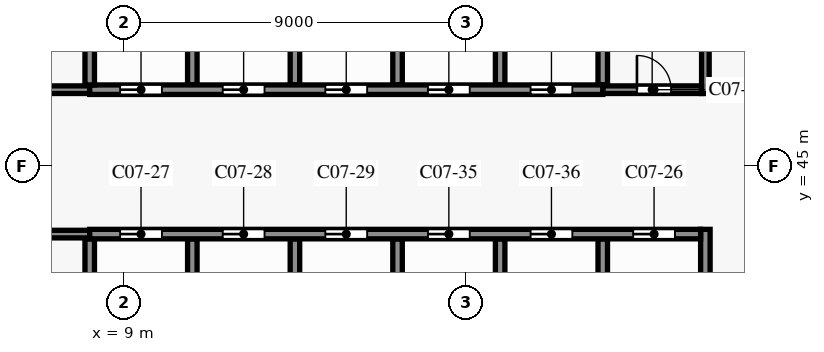
"""IFC4 building model, lengths in metres.
Left out: names, types, materials, properties, quantities, classifications, styles, units other than length and angle.
Written with IfcOpenShell. Run it as: python <this file> out.ifc"""

import sys

from ifc_helpers import new_model, si_unit, direction, frame, frame_2d, origin, place, context, subcontext, project, spatial, rectangle, extrude, element, fill, save


model = new_model("IFC4")
c1 = context("Model", 3, precision=1e-05, world=origin(), true_north=direction((0.0, 1.0)))
c2 = subcontext(c1, "Body", "Model", "MODEL_VIEW")
j1 = project(units=[si_unit("LENGTHUNIT", "METRE"), si_unit("PLANEANGLEUNIT", "RADIAN")], contexts=[c1])
p1 = place(None, origin())
s1 = spatial("IfcSite", under=j1, at=p1, CompositionType="ELEMENT")
p2 = place(p1, origin())
s2 = spatial("IfcBuilding", under=s1, at=p2, CompositionType="ELEMENT")
p3 = place(p2, frame((0.0, 0.0, 32.0)))
s3 = spatial("IfcBuildingStorey", under=s2, at=p3, CompositionType="ELEMENT", Elevation=32.0)
p4 = place(p3, frame((0.15, 43.2, 0.0), z_axis=(0.0, 0.0, 1.0), x_axis=(1.0, 0.0, 0.0)))
e1 = element("IfcWall", 1, at=p4, inside=s3, PredefinedType="PARTITIONING", context=c2, shape_type="SweptSolid", body=[
    extrude(rectangle(XDim=7.95, YDim=0.2, at=frame_2d((3.975, 0.0))), origin(), (0.0, 0.0, 1.0), 5.2),
])
p5 = place(p4, frame((0.925, 0.0, 0.0)))
e2 = element("IfcOpeningElement", 2, at=p5, cuts=e1, PredefinedType="OPENING", context=c2, shape_type="SweptSolid", body=[
    extrude(rectangle(XDim=0.9, YDim=2.1, at=frame_2d((0.45, 1.05))), frame((0.0, 0.11, 0.0), z_axis=(0.0, -1.0, 0.0), x_axis=(1.0, 0.0, 0.0)), (0.0, 0.0, 1.0), 0.22),
])
p6 = place(p4, frame((4.65, 0.0, 0.0)))
e3 = element("IfcOpeningElement", 3, at=p6, cuts=e1, PredefinedType="OPENING", context=c2, shape_type="SweptSolid", body=[
    extrude(rectangle(XDim=0.9, YDim=2.1, at=frame_2d((0.45, 1.05))), frame((0.0, 0.11, 0.0), z_axis=(0.0, -1.0, 0.0), x_axis=(1.0, 0.0, 0.0)), (0.0, 0.0, 1.0), 0.22),
])
p7 = place(p3, frame((8.1, 43.2, 0.0), z_axis=(0.0, 0.0, 1.0), x_axis=(1.0, 0.0, 0.0)))
e4 = element("IfcWall", 4, at=p7, inside=s3, PredefinedType="SHEAR", context=c2, shape_type="SweptSolid", body=[
    extrude(rectangle(XDim=16.075, YDim=0.25, at=frame_2d((8.038, 0.0))), origin(), (0.0, 0.0, 1.0), 5.2),
])
p8 = place(p7, frame((14.3, 0.0, 0.0)))
e5 = element("IfcOpeningElement", 5, at=p8, cuts=e4, PredefinedType="OPENING", context=c2, shape_type="SweptSolid", body=[
    extrude(rectangle(XDim=1.1, YDim=2.1, at=frame_2d((0.55, 1.05))), frame((0.0, 0.135, 0.0), z_axis=(0.0, -1.0, 0.0), x_axis=(1.0, 0.0, 0.0)), (0.0, 0.0, 1.0), 0.27),
])
p9 = place(p7, frame((0.8, 0.0, 0.0)))
e6 = element("IfcOpeningElement", 6, at=p9, cuts=e4, PredefinedType="OPENING", context=c2, shape_type="SweptSolid", body=[
    extrude(rectangle(XDim=1.1, YDim=2.1, at=frame_2d((0.55, 1.05))), frame((0.0, 0.135, 0.0), z_axis=(0.0, -1.0, 0.0), x_axis=(1.0, 0.0, 0.0)), (0.0, 0.0, 1.0), 0.27),
])
p10 = place(p7, frame((3.5, 0.0, 0.0)))
e7 = element("IfcOpeningElement", 7, at=p10, cuts=e4, PredefinedType="OPENING", context=c2, shape_type="SweptSolid", body=[
    extrude(rectangle(XDim=1.1, YDim=2.1, at=frame_2d((0.55, 1.05))), frame((0.0, 0.135, 0.0), z_axis=(0.0, -1.0, 0.0), x_axis=(1.0, 0.0, 0.0)), (0.0, 0.0, 1.0), 0.27),
])
p11 = place(p7, frame((6.2, 0.0, 0.0)))
e8 = element("IfcOpeningElement", 8, at=p11, cuts=e4, PredefinedType="OPENING", context=c2, shape_type="SweptSolid", body=[
    extrude(rectangle(XDim=1.1, YDim=2.1, at=frame_2d((0.55, 1.05))), frame((0.0, 0.135, 0.0), z_axis=(0.0, -1.0, 0.0), x_axis=(1.0, 0.0, 0.0)), (0.0, 0.0, 1.0), 0.27),
])
p12 = place(p7, frame((8.9, 0.0, 0.0)))
e9 = element("IfcOpeningElement", 9, at=p12, cuts=e4, PredefinedType="OPENING", context=c2, shape_type="SweptSolid", body=[
    extrude(rectangle(XDim=1.1, YDim=2.1, at=frame_2d((0.55, 1.05))), frame((0.0, 0.135, 0.0), z_axis=(0.0, -1.0, 0.0), x_axis=(1.0, 0.0, 0.0)), (0.0, 0.0, 1.0), 0.27),
])
p13 = place(p7, frame((11.6, 0.0, 0.0)))
e10 = element("IfcOpeningElement", 10, at=p13, cuts=e4, PredefinedType="OPENING", context=c2, shape_type="SweptSolid", body=[
    extrude(rectangle(XDim=1.1, YDim=2.1, at=frame_2d((0.55, 1.05))), frame((0.0, 0.135, 0.0), z_axis=(0.0, -1.0, 0.0), x_axis=(1.0, 0.0, 0.0)), (0.0, 0.0, 1.0), 0.27),
])
p14 = place(p3, frame((0.15, 47.0, 0.0), z_axis=(0.0, 0.0, 1.0), x_axis=(1.0, 0.0, 0.0)))
e11 = element("IfcWall", 11, at=p14, inside=s3, PredefinedType="PARTITIONING", context=c2, shape_type="SweptSolid", body=[
    extrude(rectangle(XDim=7.95, YDim=0.2, at=frame_2d((3.975, 0.0))), origin(), (0.0, 0.0, 1.0), 5.2),
])
p15 = place(p14, frame((0.925, 0.0, 0.0)))
e12 = element("IfcOpeningElement", 12, at=p15, cuts=e11, PredefinedType="OPENING", context=c2, shape_type="SweptSolid", body=[
    extrude(rectangle(XDim=0.9, YDim=2.1, at=frame_2d((0.45, 1.05))), frame((0.0, 0.11, 0.0), z_axis=(0.0, -1.0, 0.0), x_axis=(1.0, 0.0, 0.0)), (0.0, 0.0, 1.0), 0.22),
])
p16 = place(p14, frame((4.65, 0.0, 0.0)))
e13 = element("IfcOpeningElement", 13, at=p16, cuts=e11, PredefinedType="OPENING", context=c2, shape_type="SweptSolid", body=[
    extrude(rectangle(XDim=0.9, YDim=2.1, at=frame_2d((0.45, 1.05))), frame((0.0, 0.11, 0.0), z_axis=(0.0, -1.0, 0.0), x_axis=(1.0, 0.0, 0.0)), (0.0, 0.0, 1.0), 0.22),
])
p17 = place(p3, frame((21.6, 47.0, 0.0), z_axis=(0.0, 0.0, 1.0), x_axis=(1.0, 0.0, 0.0)))
e14 = element("IfcWall", 14, at=p17, inside=s3, PredefinedType="PARTITIONING", context=c2, shape_type="SweptSolid", body=[
    extrude(rectangle(XDim=2.6, YDim=0.2, at=frame_2d((1.3, 0.0))), origin(), (0.0, 0.0, 1.0), 5.2),
])
p18 = place(p17, frame((0.9, 0.0, 0.0)))
e15 = element("IfcOpeningElement", 15, at=p18, cuts=e14, PredefinedType="OPENING", context=c2, shape_type="SweptSolid", body=[
    extrude(rectangle(XDim=0.9, YDim=2.1, at=frame_2d((0.45, 1.05))), frame((0.0, 0.11, 0.0), z_axis=(0.0, -1.0, 0.0), x_axis=(1.0, 0.0, 0.0)), (0.0, 0.0, 1.0), 0.22),
])
p19 = place(p3, frame((8.1, 47.0, 0.0), z_axis=(0.0, 0.0, 1.0), x_axis=(1.0, 0.0, 0.0)))
e16 = element("IfcWall", 16, at=p19, inside=s3, PredefinedType="SHEAR", context=c2, shape_type="SweptSolid", body=[
    extrude(rectangle(XDim=13.5, YDim=0.25, at=frame_2d((6.75, 0.0))), origin(), (0.0, 0.0, 1.0), 5.2),
])
p20 = place(p19, frame((0.8, 0.0, 0.0)))
e17 = element("IfcOpeningElement", 17, at=p20, cuts=e16, PredefinedType="OPENING", context=c2, shape_type="SweptSolid", body=[
    extrude(rectangle(XDim=1.1, YDim=2.1, at=frame_2d((0.55, 1.05))), frame((0.0, 0.135, 0.0), z_axis=(0.0, -1.0, 0.0), x_axis=(1.0, 0.0, 0.0)), (0.0, 0.0, 1.0), 0.27),
])
p21 = place(p19, frame((3.5, 0.0, 0.0)))
e18 = element("IfcOpeningElement", 18, at=p21, cuts=e16, PredefinedType="OPENING", context=c2, shape_type="SweptSolid", body=[
    extrude(rectangle(XDim=1.1, YDim=2.1, at=frame_2d((0.55, 1.05))), frame((0.0, 0.135, 0.0), z_axis=(0.0, -1.0, 0.0), x_axis=(1.0, 0.0, 0.0)), (0.0, 0.0, 1.0), 0.27),
])
p22 = place(p19, frame((6.2, 0.0, 0.0)))
e19 = element("IfcOpeningElement", 19, at=p22, cuts=e16, PredefinedType="OPENING", context=c2, shape_type="SweptSolid", body=[
    extrude(rectangle(XDim=1.1, YDim=2.1, at=frame_2d((0.55, 1.05))), frame((0.0, 0.135, 0.0), z_axis=(0.0, -1.0, 0.0), x_axis=(1.0, 0.0, 0.0)), (0.0, 0.0, 1.0), 0.27),
])
p23 = place(p19, frame((8.9, 0.0, 0.0)))
e20 = element("IfcOpeningElement", 20, at=p23, cuts=e16, PredefinedType="OPENING", context=c2, shape_type="SweptSolid", body=[
    extrude(rectangle(XDim=1.1, YDim=2.1, at=frame_2d((0.55, 1.05))), frame((0.0, 0.135, 0.0), z_axis=(0.0, -1.0, 0.0), x_axis=(1.0, 0.0, 0.0)), (0.0, 0.0, 1.0), 0.27),
])
p24 = place(p19, frame((11.6, 0.0, 0.0)))
e21 = element("IfcOpeningElement", 21, at=p24, cuts=e16, PredefinedType="OPENING", context=c2, shape_type="SweptSolid", body=[
    extrude(rectangle(XDim=1.1, YDim=2.1, at=frame_2d((0.55, 1.05))), frame((0.0, 0.135, 0.0), z_axis=(0.0, -1.0, 0.0), x_axis=(1.0, 0.0, 0.0)), (0.0, 0.0, 1.0), 0.27),
])
for number, where, z_axis, x_axis in (
    (22, (8.1, 40.125, 0.0), (0.0, 0.0, 1.0), (0.0, 1.0, 0.0)),
    (23, (8.1, 47.125, 0.0), (0.0, 0.0, 1.0), (0.0, 1.0, 0.0)),
    (24, (10.8, 40.125, 0.0), (0.0, 0.0, 1.0), (0.0, 1.0, 0.0)),
    (25, (10.8, 47.125, 0.0), (0.0, 0.0, 1.0), (0.0, 1.0, 0.0)),
    (26, (13.5, 40.125, 0.0), (0.0, 0.0, 1.0), (0.0, 1.0, 0.0)),
    (27, (13.5, 47.125, 0.0), (0.0, 0.0, 1.0), (0.0, 1.0, 0.0)),
    (28, (16.2, 40.125, 0.0), (0.0, 0.0, 1.0), (0.0, 1.0, 0.0)),
    (29, (16.2, 47.125, 0.0), (0.0, 0.0, 1.0), (0.0, 1.0, 0.0)),
    (30, (18.9, 40.125, 0.0), (0.0, 0.0, 1.0), (0.0, 1.0, 0.0)),
    (31, (18.9, 47.125, 0.0), (0.0, 0.0, 1.0), (0.0, 1.0, 0.0)),
    (32, (21.6, 40.125, 0.0), (0.0, 0.0, 1.0), (0.0, 1.0, 0.0)),
):
    element("IfcWall", number, at=place(p3, frame(where, z_axis=z_axis, x_axis=x_axis)), inside=s3, PredefinedType="SHEAR", context=c2, shape_type="SweptSolid", body=[
        extrude(rectangle(XDim=2.95, YDim=0.25, at=frame_2d((1.475, 0.0))), origin(), (0.0, 0.0, 1.0), 5.2),
    ])
p25 = place(p3, frame((21.6, 47.125, 0.0), z_axis=(0.0, 0.0, 1.0), x_axis=(0.0, 1.0, 0.0)))
e33 = element("IfcWall", 33, at=p25, inside=s3, PredefinedType="SHEAR", context=c2, shape_type="SweptSolid", body=[
    extrude(rectangle(XDim=3.075, YDim=0.25, at=frame_2d((1.538, 0.0))), origin(), (0.0, 0.0, 1.0), 5.2),
])
p26 = place(p3, frame((24.3, 46.9, 0.0), z_axis=(0.0, 0.0, 1.0), x_axis=(0.0, 1.0, 0.0)))
e34 = element("IfcWall", 34, at=p26, inside=s3, PredefinedType="SHEAR", context=c2, shape_type="SweptSolid", body=[
    extrude(rectangle(XDim=5.0, YDim=0.2, at=frame_2d((2.5, 0.0))), origin(), (0.0, 0.0, 1.0), 5.2),
])
p27 = place(p3, frame((24.3, 40.0, 0.0), z_axis=(0.0, 0.0, 1.0), x_axis=(0.0, 1.0, 0.0)))
e35 = element("IfcWall", 35, at=p27, inside=s3, PredefinedType="SHEAR", context=c2, shape_type="SweptSolid", body=[
    extrude(rectangle(XDim=3.325, YDim=0.25, at=frame_2d((1.663, 0.0))), origin(), (0.0, 0.0, 1.0), 5.2),
])
p28 = place(p18, origin())
e36 = element("IfcDoor", 36, at=p28, inside=s3, OperationType="SINGLE_SWING_LEFT", PredefinedType="DOOR", context=c2, shape_type="SweptSolid", body=[
    extrude(rectangle(XDim=0.9, YDim=2.1, at=frame_2d((0.45, 1.05))), frame((0.0, 0.025, 0.0), z_axis=(0.0, -1.0, 0.0), x_axis=(1.0, 0.0, 0.0)), (0.0, 0.0, 1.0), 0.05),
])
fill(e15, e36)
p29 = place(p8, origin())
e37 = element("IfcDoor", 37, at=p29, inside=s3, OperationType="DOUBLE_DOOR_SLIDING", PredefinedType="DOOR", context=c2, shape_type="SweptSolid", body=[
    extrude(rectangle(XDim=1.1, YDim=2.1, at=frame_2d((0.55, 1.05))), frame((0.0, 0.025, 0.0), z_axis=(0.0, -1.0, 0.0), x_axis=(1.0, 0.0, 0.0)), (0.0, 0.0, 1.0), 0.05),
])
fill(e5, e37)
p30 = place(p9, origin())
e38 = element("IfcDoor", 38, at=p30, inside=s3, OperationType="DOUBLE_DOOR_SLIDING", PredefinedType="DOOR", context=c2, shape_type="SweptSolid", body=[
    extrude(rectangle(XDim=1.1, YDim=2.1, at=frame_2d((0.55, 1.05))), frame((0.0, 0.025, 0.0), z_axis=(0.0, -1.0, 0.0), x_axis=(1.0, 0.0, 0.0)), (0.0, 0.0, 1.0), 0.05),
])
fill(e6, e38)
p31 = place(p10, origin())
e39 = element("IfcDoor", 39, at=p31, inside=s3, OperationType="DOUBLE_DOOR_SLIDING", PredefinedType="DOOR", context=c2, shape_type="SweptSolid", body=[
    extrude(rectangle(XDim=1.1, YDim=2.1, at=frame_2d((0.55, 1.05))), frame((0.0, 0.025, 0.0), z_axis=(0.0, -1.0, 0.0), x_axis=(1.0, 0.0, 0.0)), (0.0, 0.0, 1.0), 0.05),
])
fill(e7, e39)
p32 = place(p11, origin())
e40 = element("IfcDoor", 40, at=p32, inside=s3, OperationType="DOUBLE_DOOR_SLIDING", PredefinedType="DOOR", context=c2, shape_type="SweptSolid", body=[
    extrude(rectangle(XDim=1.1, YDim=2.1, at=frame_2d((0.55, 1.05))), frame((0.0, 0.025, 0.0), z_axis=(0.0, -1.0, 0.0), x_axis=(1.0, 0.0, 0.0)), (0.0, 0.0, 1.0), 0.05),
])
fill(e8, e40)
p33 = place(p20, origin())
e41 = element("IfcDoor", 41, at=p33, inside=s3, OperationType="DOUBLE_DOOR_SLIDING", PredefinedType="DOOR", context=c2, shape_type="SweptSolid", body=[
    extrude(rectangle(XDim=1.1, YDim=2.1, at=frame_2d((0.55, 1.05))), frame((0.0, 0.025, 0.0), z_axis=(0.0, -1.0, 0.0), x_axis=(1.0, 0.0, 0.0)), (0.0, 0.0, 1.0), 0.05),
])
fill(e17, e41)
p34 = place(p21, origin())
e42 = element("IfcDoor", 42, at=p34, inside=s3, OperationType="DOUBLE_DOOR_SLIDING", PredefinedType="DOOR", context=c2, shape_type="SweptSolid", body=[
    extrude(rectangle(XDim=1.1, YDim=2.1, at=frame_2d((0.55, 1.05))), frame((0.0, 0.025, 0.0), z_axis=(0.0, -1.0, 0.0), x_axis=(1.0, 0.0, 0.0)), (0.0, 0.0, 1.0), 0.05),
])
fill(e18, e42)
p35 = place(p22, origin())
e43 = element("IfcDoor", 43, at=p35, inside=s3, OperationType="DOUBLE_DOOR_SLIDING", PredefinedType="DOOR", context=c2, shape_type="SweptSolid", body=[
    extrude(rectangle(XDim=1.1, YDim=2.1, at=frame_2d((0.55, 1.05))), frame((0.0, 0.025, 0.0), z_axis=(0.0, -1.0, 0.0), x_axis=(1.0, 0.0, 0.0)), (0.0, 0.0, 1.0), 0.05),
])
fill(e19, e43)
p36 = place(p23, origin())
e44 = element("IfcDoor", 44, at=p36, inside=s3, OperationType="DOUBLE_DOOR_SLIDING", PredefinedType="DOOR", context=c2, shape_type="SweptSolid", body=[
    extrude(rectangle(XDim=1.1, YDim=2.1, at=frame_2d((0.55, 1.05))), frame((0.0, 0.025, 0.0), z_axis=(0.0, -1.0, 0.0), x_axis=(1.0, 0.0, 0.0)), (0.0, 0.0, 1.0), 0.05),
])
fill(e20, e44)
p37 = place(p24, origin())
e45 = element("IfcDoor", 45, at=p37, inside=s3, OperationType="DOUBLE_DOOR_SLIDING", PredefinedType="DOOR", context=c2, shape_type="SweptSolid", body=[
    extrude(rectangle(XDim=1.1, YDim=2.1, at=frame_2d((0.55, 1.05))), frame((0.0, 0.025, 0.0), z_axis=(0.0, -1.0, 0.0), x_axis=(1.0, 0.0, 0.0)), (0.0, 0.0, 1.0), 0.05),
])
fill(e21, e45)
p38 = place(p12, origin())
e46 = element("IfcDoor", 46, at=p38, inside=s3, OperationType="DOUBLE_DOOR_SLIDING", PredefinedType="DOOR", context=c2, shape_type="SweptSolid", body=[
    extrude(rectangle(XDim=1.1, YDim=2.1, at=frame_2d((0.55, 1.05))), frame((0.0, 0.025, 0.0), z_axis=(0.0, -1.0, 0.0), x_axis=(1.0, 0.0, 0.0)), (0.0, 0.0, 1.0), 0.05),
])
fill(e9, e46)
p39 = place(p13, origin())
e47 = element("IfcDoor", 47, at=p39, inside=s3, OperationType="DOUBLE_DOOR_SLIDING", PredefinedType="DOOR", context=c2, shape_type="SweptSolid", body=[
    extrude(rectangle(XDim=1.1, YDim=2.1, at=frame_2d((0.55, 1.05))), frame((0.0, 0.025, 0.0), z_axis=(0.0, -1.0, 0.0), x_axis=(1.0, 0.0, 0.0)), (0.0, 0.0, 1.0), 0.05),
])
fill(e10, e47)
save(model, sys.argv[1])
